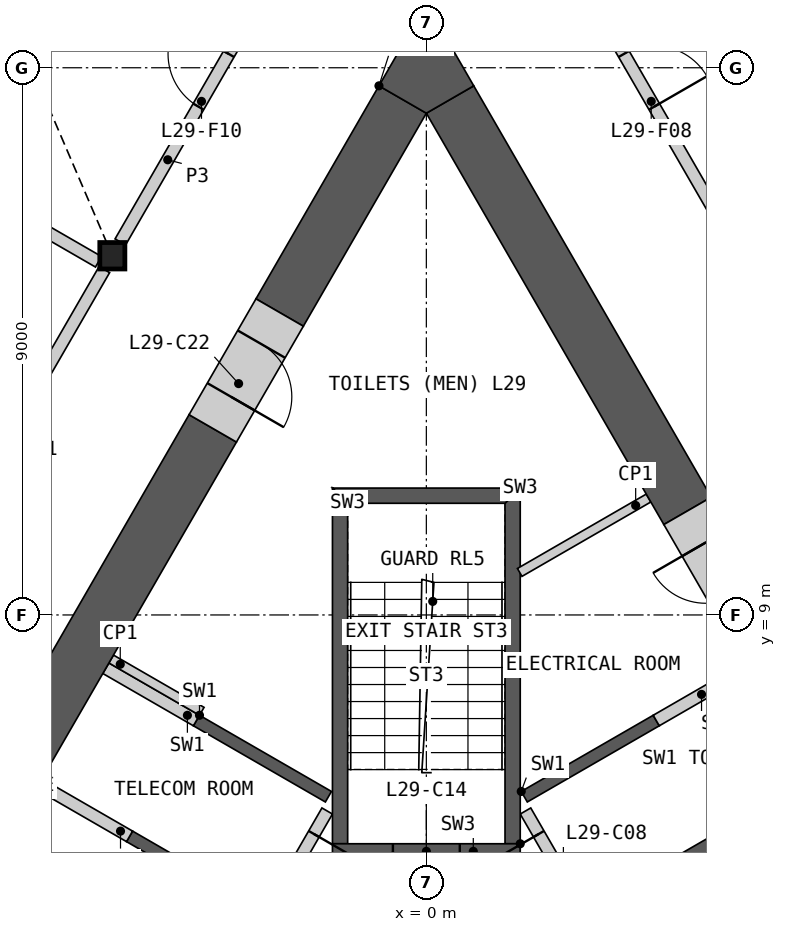
"""IFC4 building model, lengths in metres.
Left out: names, types, materials, properties, quantities, classifications, styles, units other than length and angle.
Written with IfcOpenShell. Run it as: python <this file> out.ifc"""

import sys

from ifc_helpers import new_model, si_unit, direction, frame, frame_2d, origin, origin_2d, place, context, subcontext, project, spatial, polyline, rectangle, i_section, outline, extrude, element, fill, save


model = new_model("IFC4")
c1 = context("Model", 3, precision=1e-05, world=origin(), true_north=direction((0.0, 1.0)))
c2 = subcontext(c1, "Body", "Model", "MODEL_VIEW")
j1 = project(units=[si_unit("LENGTHUNIT", "METRE"), si_unit("PLANEANGLEUNIT", "RADIAN")], contexts=[c1])
p1 = place(None, origin())
s1 = spatial("IfcSite", under=j1, at=p1, CompositionType="ELEMENT")
p2 = place(p1, origin())
s2 = spatial("IfcBuilding", under=s1, at=p2, CompositionType="ELEMENT")
p3 = place(p2, frame((0.0, 0.0, 137.4)))
s3 = spatial("IfcBuildingStorey", under=s2, at=p3, CompositionType="ELEMENT", Elevation=137.4)
p4 = place(p3, frame((-5.164, 14.908, 0.0), z_axis=(0.0, 0.0, 1.0), x_axis=(1.0, 0.0, 0.0)))
e1 = element("IfcColumn", 1, at=p4, inside=s3, PredefinedType="COLUMN", context=c2, shape_type="SweptSolid", body=[
    extrude(i_section(OverallWidth=0.412, OverallDepth=0.435, WebThickness=0.036, FlangeThickness=0.057, at=origin_2d()), origin(), (0.0, 0.0, 1.0), 4.2),
])
p5 = place(p3, origin())
e2 = element("IfcWall", 2, at=p5, inside=s3, PredefinedType="SHEAR", context=c2, shape_type="SweptSolid", body=[
    extrude(outline(polyline([(1.561, 6.097), (3.731, 7.35), (3.831, 7.177), (1.66, 5.924), (1.561, 6.097)])), origin(), (0.0, 0.0, 1.0), 3.8),
])
p6 = place(p3, origin())
e3 = element("IfcWall", 3, at=p6, inside=s3, PredefinedType="SHEAR", context=c2, shape_type="SweptSolid", body=[
    extrude(outline(polyline([(2.66, 4.192), (4.831, 5.445), (8.231, -0.444), (6.061, -1.697), (5.96, -1.524), (7.952, -0.374), (6.952, 1.358), (4.96, 0.208), (4.861, 0.381), (6.852, 1.531), (5.852, 3.263), (3.861, 2.113), (3.76, 2.287), (5.752, 3.437), (4.752, 5.169), (2.76, 4.019), (2.66, 4.192)])), origin(), (0.0, 0.0, 1.0), 3.8),
])
p7 = place(p3, frame((5.817, -1.476, 0.0), z_axis=(0.0, 0.0, 1.0), x_axis=(-0.500002616675, 0.866023893041, 0.0)))
e4 = element("IfcWall", 4, at=p7, inside=s3, PredefinedType="SOLIDWALL", context=c2, shape_type="SweptSolid", body=[
    extrude(rectangle(XDim=8.373, YDim=0.2, at=frame_2d((4.187, 0.0))), origin(), (0.0, 0.0, 1.0), 3.8),
])
p8 = place(p7, frame((0.337, 0.0, 0.0)))
e5 = element("IfcOpeningElement", 5, at=p8, cuts=e4, PredefinedType="OPENING", context=c2, shape_type="SweptSolid", body=[
    extrude(rectangle(XDim=1.1, YDim=2.1, at=frame_2d((0.55, 1.05))), frame((0.0, 0.11, 0.0), z_axis=(0.0, -1.0, 0.0), x_axis=(1.0, 0.0, 0.0)), (0.0, 0.0, 1.0), 0.22),
])
p9 = place(p7, frame((2.537, 0.0, 0.0)))
e6 = element("IfcOpeningElement", 6, at=p9, cuts=e4, PredefinedType="OPENING", context=c2, shape_type="SweptSolid", body=[
    extrude(rectangle(XDim=1.1, YDim=2.1, at=frame_2d((0.55, 1.05))), frame((0.0, 0.11, 0.0), z_axis=(0.0, -1.0, 0.0), x_axis=(1.0, 0.0, 0.0)), (0.0, 0.0, 1.0), 0.22),
])
p10 = place(p7, frame((4.737, 0.0, 0.0)))
e7 = element("IfcOpeningElement", 7, at=p10, cuts=e4, PredefinedType="OPENING", context=c2, shape_type="SweptSolid", body=[
    extrude(rectangle(XDim=1.1, YDim=2.1, at=frame_2d((0.55, 1.05))), frame((0.0, 0.11, 0.0), z_axis=(0.0, -1.0, 0.0), x_axis=(1.0, 0.0, 0.0)), (0.0, 0.0, 1.0), 0.22),
])
p11 = place(p7, frame((7.037, 0.0, 0.0)))
e8 = element("IfcOpeningElement", 8, at=p11, cuts=e4, PredefinedType="OPENING", context=c2, shape_type="SweptSolid", body=[
    extrude(rectangle(XDim=0.9, YDim=2.1, at=frame_2d((0.45, 1.05))), frame((0.0, 0.11, 0.0), z_axis=(0.0, -1.0, 0.0), x_axis=(1.0, 0.0, 0.0)), (0.0, 0.0, 1.0), 0.22),
])
p12 = place(p3, frame((3.781, 7.263, 0.0), z_axis=(0.0, 0.0, 1.0), x_axis=(0.865963414263, 0.500107353632, 0.0)))
e9 = element("IfcWall", 9, at=p12, inside=s3, PredefinedType="SHEAR", context=c2, shape_type="SweptSolid", body=[
    extrude(rectangle(XDim=1.72, YDim=0.2, at=frame_2d((0.86, 0.0))), origin(), (0.0, 0.0, 1.0), 3.8),
])
p13 = place(p3, origin())
e10 = element("IfcWall", 10, at=p13, inside=s3, PredefinedType="SHEAR", context=c2, shape_type="SweptSolid", body=[
    extrude(outline(polyline([(-2.76, 4.019), (-4.931, 5.272), (-4.831, 5.445), (-2.66, 4.192), (-2.76, 4.019)])), origin(), (0.0, 0.0, 1.0), 3.8),
])
p14 = place(p3, origin())
e11 = element("IfcWall", 11, at=p14, inside=s3, PredefinedType="SHEAR", context=c2, shape_type="SweptSolid", body=[
    extrude(outline(polyline([(-3.731, 7.35), (-1.561, 6.097), (-1.66, 5.924), (-3.831, 7.177), (-3.731, 7.35)])), origin(), (0.0, 0.0, 1.0), 3.8),
])
p15 = place(p3, frame((-1.631, 5.776, 0.0), z_axis=(0.0, 0.0, 1.0), x_axis=(-0.499992876559, -0.866029516466, 0.0)))
e12 = element("IfcWall", 12, at=p15, inside=s3, PredefinedType="SOLIDWALL", context=c2, shape_type="SweptSolid", body=[
    extrude(rectangle(XDim=6.486, YDim=0.2, at=frame_2d((3.243, 0.0))), origin(), (0.0, 0.0, 1.0), 3.8),
])
p16 = place(p15, frame((0.437, 0.0, 0.0)))
e13 = element("IfcOpeningElement", 13, at=p16, cuts=e12, PredefinedType="OPENING", context=c2, shape_type="SweptSolid", body=[
    extrude(rectangle(XDim=0.9, YDim=2.1, at=frame_2d((0.45, 1.05))), frame((0.0, 0.11, 0.0), z_axis=(0.0, -1.0, 0.0), x_axis=(1.0, 0.0, 0.0)), (0.0, 0.0, 1.0), 0.22),
])
p17 = place(p15, frame((2.637, 0.0, 0.0)))
e14 = element("IfcOpeningElement", 14, at=p17, cuts=e12, PredefinedType="OPENING", context=c2, shape_type="SweptSolid", body=[
    extrude(rectangle(XDim=0.9, YDim=2.1, at=frame_2d((0.45, 1.05))), frame((0.0, 0.11, 0.0), z_axis=(0.0, -1.0, 0.0), x_axis=(1.0, 0.0, 0.0)), (0.0, 0.0, 1.0), 0.22),
])
for number, where, z_axis, x_axis in (
    (15, (-3.781, 7.263, 0.0), (0.0, 0.0, 1.0), (-0.866, 0.5, 0.0)),
    (16, (-4.881, 5.358, 0.0), (0.0, 0.0, 1.0), (-0.866, 0.5, 0.0)),
):
    element("IfcWall", number, at=place(p3, frame(where, z_axis=z_axis, x_axis=x_axis)), inside=s3, PredefinedType="SHEAR", context=c2, shape_type="SweptSolid", body=[
        extrude(rectangle(XDim=1.72, YDim=0.2, at=frame_2d((0.86, 0.0))), origin(), (0.0, 0.0, 1.0), 3.8),
    ])
p18 = place(p3, origin())
e17 = element("IfcWall", 17, at=p18, inside=s3, PredefinedType="SHEAR", context=c2, shape_type="SweptSolid", body=[
    extrude(outline(polyline([(1.544, 5.237), (1.544, 11.087), (1.294, 10.837), (1.294, 5.237), (1.544, 5.237)])), origin(), (0.0, 0.0, 1.0), 3.8),
])
p19 = place(p3, origin())
e18 = element("IfcWall", 18, at=p19, inside=s3, PredefinedType="SHEAR", context=c2, shape_type="SweptSolid", body=[
    extrude(outline(polyline([(1.544, 11.087), (-1.544, 11.087), (-1.294, 10.837), (1.294, 10.837), (1.544, 11.087)])), origin(), (0.0, 0.0, 1.0), 3.8),
])
p20 = place(p3, origin())
e19 = element("IfcWall", 19, at=p20, inside=s3, PredefinedType="SHEAR", context=c2, shape_type="SweptSolid", body=[
    extrude(outline(polyline([(-1.294, 10.837), (-1.544, 11.087), (-1.544, 5.237), (-1.294, 5.237), (-1.294, 10.837)])), origin(), (0.0, 0.0, 1.0), 3.8),
])
p21 = place(p3, frame((1.544, 5.112, 0.0), z_axis=(0.0, 0.0, 1.0), x_axis=(-1.0, 0.0, 0.0)))
e20 = element("IfcWall", 20, at=p21, inside=s3, PredefinedType="SHEAR", context=c2, shape_type="SweptSolid", body=[
    extrude(rectangle(XDim=3.088, YDim=0.25, at=frame_2d((1.544, 0.0))), origin(), (0.0, 0.0, 1.0), 3.8),
])
p22 = place(p21, frame((0.994, 0.0, 0.0)))
e21 = element("IfcOpeningElement", 21, at=p22, cuts=e20, PredefinedType="OPENING", context=c2, shape_type="SweptSolid", body=[
    extrude(rectangle(XDim=1.1, YDim=2.1, at=frame_2d((0.55, 1.05))), frame((0.0, 0.135, 0.0), z_axis=(0.0, -1.0, 0.0), x_axis=(1.0, 0.0, 0.0)), (0.0, 0.0, 1.0), 0.27),
])
p23 = place(p3, frame((-3.693, 7.415, 0.0), z_axis=(0.0, 0.0, 1.0), x_axis=(-0.866024871741, 0.500000921525, 0.0)))
e22 = element("IfcWall", 22, at=p23, inside=s3, PredefinedType="PARTITIONING", context=c2, shape_type="SweptSolid", body=[
    extrude(rectangle(XDim=1.72, YDim=0.15, at=frame_2d((0.86, 0.0))), origin(), (0.0, 0.0, 1.0), 3.8),
])
p24 = place(p3, frame((3.654, 10.923, 0.0), z_axis=(0.0, 0.0, 1.0), x_axis=(-0.865974546186, -0.5000880776, 0.0)))
e23 = element("IfcWall", 23, at=p24, inside=s3, PredefinedType="PARTITIONING", context=c2, shape_type="SweptSolid", body=[
    extrude(rectangle(XDim=2.447, YDim=0.15, at=frame_2d((1.223, 0.0))), origin(), (0.0, 0.0, 1.0), 3.8),
])
p25 = place(p3, frame((4.296, 10.712, 0.0), z_axis=(0.0, 0.0, 1.0), x_axis=(-0.500011000363, 0.866019052629, 0.0)))
e24 = element("IfcWall", 24, at=p25, inside=s3, PredefinedType="SHEAR", context=c2, shape_type="SweptSolid", body=[
    extrude(rectangle(XDim=7.812, YDim=0.9, at=frame_2d((3.906, 0.0))), origin(), (0.0, 0.0, 1.0), 3.8),
])
p26 = place(p3, frame((-3.512, 12.069, 0.0), z_axis=(0.0, 0.0, 1.0), x_axis=(-0.500002126466, -0.866024176065, 0.0)))
e25 = element("IfcWall", 25, at=p26, inside=s3, PredefinedType="SHEAR", context=c2, shape_type="SweptSolid", body=[
    extrude(rectangle(XDim=8.816, YDim=0.9, at=frame_2d((4.408, 0.0))), origin(), (0.0, 0.0, 1.0), 3.8),
])
p27 = place(p3, frame((-0.39, 17.478, 0.0), z_axis=(0.0, 0.0, 1.0), x_axis=(-0.500046330384, -0.865998653272, 0.0)))
e26 = element("IfcWall", 26, at=p27, inside=s3, PredefinedType="SHEAR", context=c2, shape_type="SweptSolid", body=[
    extrude(rectangle(XDim=4.045, YDim=0.9, at=frame_2d((2.023, 0.0))), origin(), (0.0, 0.0, 1.0), 3.8),
])
p28 = place(p3, origin())
e27 = element("IfcWall", 27, at=p28, inside=s3, PredefinedType="SHEAR", context=c2, shape_type="SweptSolid", body=[
    extrude(outline(polyline([(-0.779, 17.703), (0.0, 19.052), (0.779, 17.703), (0.0, 17.253), (-0.779, 17.703)])), origin(), (0.0, 0.0, 1.0), 3.8),
])
p29 = place(p3, frame((5.396, 8.806, 0.0), z_axis=(0.0, 0.0, 1.0), x_axis=(-0.499981787252, 0.866035918664, 0.0)))
e28 = element("IfcWall", 28, at=p29, inside=s3, PredefinedType="SHEAR", context=c2, shape_type="SweptSolid", body=[
    extrude(rectangle(XDim=2.2, YDim=0.9, at=frame_2d((1.1, 0.0))), origin(), (0.0, 0.0, 1.0), 3.8),
])
p30 = place(p29, frame((0.6, 0.0, 0.0)))
e29 = element("IfcOpeningElement", 29, at=p30, cuts=e28, PredefinedType="OPENING", context=c2, shape_type="SweptSolid", body=[
    extrude(rectangle(XDim=1.0, YDim=2.1, at=frame_2d((0.5, 1.05))), frame((0.0, 0.46, 0.0), z_axis=(0.0, -1.0, 0.0), x_axis=(1.0, 0.0, 0.0)), (0.0, 0.0, 1.0), 0.92),
])
p31 = place(p3, frame((-2.413, 13.974, 0.0), z_axis=(0.0, 0.0, 1.0), x_axis=(-0.499946605688, -0.86605622881, 0.0)))
e30 = element("IfcWall", 30, at=p31, inside=s3, PredefinedType="SHEAR", context=c2, shape_type="SweptSolid", body=[
    extrude(rectangle(XDim=2.2, YDim=0.9, at=frame_2d((1.1, 0.0))), origin(), (0.0, 0.0, 1.0), 3.8),
])
p32 = place(p31, frame((0.6, 0.0, 0.0)))
e31 = element("IfcOpeningElement", 31, at=p32, cuts=e30, PredefinedType="OPENING", context=c2, shape_type="SweptSolid", body=[
    extrude(rectangle(XDim=1.0, YDim=2.1, at=frame_2d((0.5, 1.05))), frame((0.0, 0.46, 0.0), z_axis=(0.0, -1.0, 0.0), x_axis=(1.0, 0.0, 0.0)), (0.0, 0.0, 1.0), 0.92),
])
p33 = place(p3, frame((-10.197, 6.19, 0.0), z_axis=(0.0, 0.0, 1.0), x_axis=(0.500012035596, 0.866018454918, 0.0)))
e32 = element("IfcWall", 32, at=p33, inside=s3, PredefinedType="PARTITIONING", context=c2, shape_type="SweptSolid", body=[
    extrude(rectangle(XDim=9.803, YDim=0.2, at=frame_2d((4.902, 0.0))), origin(), (0.0, 0.0, 1.0), 3.8),
])
p34 = place(p33, frame((6.853, 0.0, 0.0)))
e33 = element("IfcOpeningElement", 33, at=p34, cuts=e32, PredefinedType="OPENING", context=c2, shape_type="SweptSolid", body=[
    extrude(rectangle(XDim=1.0, YDim=2.1, at=frame_2d((0.5, 1.05))), frame((0.0, 0.11, 0.0), z_axis=(0.0, -1.0, 0.0), x_axis=(1.0, 0.0, 0.0)), (0.0, 0.0, 1.0), 0.22),
])
p35 = place(p33, frame((1.851, 0.0, 0.0)))
e34 = element("IfcOpeningElement", 34, at=p35, cuts=e32, PredefinedType="OPENING", context=c2, shape_type="SweptSolid", body=[
    extrude(rectangle(XDim=1.0, YDim=2.1, at=frame_2d((0.5, 1.05))), frame((0.0, 0.11, 0.0), z_axis=(0.0, -1.0, 0.0), x_axis=(1.0, 0.0, 0.0)), (0.0, 0.0, 1.0), 0.22),
])
p36 = place(p3, frame((-5.033, 15.135, 0.0), z_axis=(0.0, 0.0, 1.0), x_axis=(0.499980978912, 0.866036385336, 0.0)))
e35 = element("IfcWall", 35, at=p36, inside=s3, PredefinedType="PARTITIONING", context=c2, shape_type="SweptSolid", body=[
    extrude(rectangle(XDim=6.24, YDim=0.2, at=frame_2d((3.12, 0.0))), origin(), (0.0, 0.0, 1.0), 3.8),
])
p37 = place(p36, frame((2.57, 0.0, 0.0)))
e36 = element("IfcOpeningElement", 36, at=p37, cuts=e35, PredefinedType="OPENING", context=c2, shape_type="SweptSolid", body=[
    extrude(rectangle(XDim=1.0, YDim=2.1, at=frame_2d((0.5, 1.05))), frame((0.0, 0.11, 0.0), z_axis=(0.0, -1.0, 0.0), x_axis=(1.0, 0.0, 0.0)), (0.0, 0.0, 1.0), 0.22),
])
p38 = place(p3, frame((1.913, 20.539, 0.0), z_axis=(0.0, 0.0, 1.0), x_axis=(0.499980978912, -0.866036385336, 0.0)))
e37 = element("IfcWall", 37, at=p38, inside=s3, PredefinedType="PARTITIONING", context=c2, shape_type="SweptSolid", body=[
    extrude(rectangle(XDim=6.24, YDim=0.2, at=frame_2d((3.12, 0.0))), origin(), (0.0, 0.0, 1.0), 3.8),
])
p39 = place(p38, frame((2.67, 0.0, 0.0)))
e38 = element("IfcOpeningElement", 38, at=p39, cuts=e37, PredefinedType="OPENING", context=c2, shape_type="SweptSolid", body=[
    extrude(rectangle(XDim=1.0, YDim=2.1, at=frame_2d((0.5, 1.05))), frame((0.0, 0.11, 0.0), z_axis=(0.0, -1.0, 0.0), x_axis=(1.0, 0.0, 0.0)), (0.0, 0.0, 1.0), 0.22),
])
p40 = place(p3, frame((-16.436, 21.186, 0.0), z_axis=(0.0, 0.0, 1.0), x_axis=(0.866023321739, -0.500003606191, 0.0)))
e39 = element("IfcWall", 39, at=p40, inside=s3, PredefinedType="PARTITIONING", context=c2, shape_type="SweptSolid", body=[
    extrude(rectangle(XDim=12.753, YDim=0.2, at=frame_2d((6.377, 0.0))), origin(), (0.0, 0.0, 1.0), 2.885),
])
p41 = place(p11, origin())
e40 = element("IfcDoor", 40, at=p41, inside=s3, OperationType="SINGLE_SWING_RIGHT", PredefinedType="DOOR", context=c2, shape_type="SweptSolid", body=[
    extrude(rectangle(XDim=0.9, YDim=2.1, at=frame_2d((0.45, 1.05))), frame((0.0, 0.025, 0.0), z_axis=(0.0, -1.0, 0.0), x_axis=(1.0, 0.0, 0.0)), (0.0, 0.0, 1.0), 0.05),
])
fill(e8, e40)
p42 = place(p16, origin())
e41 = element("IfcDoor", 41, at=p42, inside=s3, OperationType="SINGLE_SWING_LEFT", PredefinedType="DOOR", context=c2, shape_type="SweptSolid", body=[
    extrude(rectangle(XDim=0.9, YDim=2.1, at=frame_2d((0.45, 1.05))), frame((0.0, 0.025, 0.0), z_axis=(0.0, -1.0, 0.0), x_axis=(1.0, 0.0, 0.0)), (0.0, 0.0, 1.0), 0.05),
])
fill(e13, e41)
p43 = place(p22, origin())
e42 = element("IfcDoor", 42, at=p43, inside=s3, OperationType="SINGLE_SWING_RIGHT", PredefinedType="DOOR", context=c2, shape_type="SweptSolid", body=[
    extrude(rectangle(XDim=1.1, YDim=2.1, at=frame_2d((0.55, 1.05))), frame((0.0, 0.025, 0.0), z_axis=(0.0, -1.0, 0.0), x_axis=(1.0, 0.0, 0.0)), (0.0, 0.0, 1.0), 0.05),
])
fill(e21, e42)
p44 = place(p30, origin())
e43 = element("IfcDoor", 43, at=p44, inside=s3, OperationType="SINGLE_SWING_RIGHT", PredefinedType="DOOR", context=c2, shape_type="SweptSolid", body=[
    extrude(rectangle(XDim=1.0, YDim=2.1, at=frame_2d((0.5, 1.05))), frame((0.0, 0.205, 0.0), z_axis=(0.0, -1.0, 0.0), x_axis=(1.0, 0.0, 0.0)), (0.0, 0.0, 1.0), 0.05),
])
fill(e29, e43)
p45 = place(p32, origin())
e44 = element("IfcDoor", 44, at=p45, inside=s3, OperationType="SINGLE_SWING_RIGHT", PredefinedType="DOOR", context=c2, shape_type="SweptSolid", body=[
    extrude(rectangle(XDim=1.0, YDim=2.1, at=frame_2d((0.5, 1.05))), frame((0.0, 0.205, 0.0), z_axis=(0.0, -1.0, 0.0), x_axis=(1.0, 0.0, 0.0)), (0.0, 0.0, 1.0), 0.05),
])
fill(e31, e44)
p46 = place(p39, origin())
e45 = element("IfcDoor", 45, at=p46, inside=s3, OperationType="SINGLE_SWING_RIGHT", PredefinedType="DOOR", context=c2, shape_type="SweptSolid", body=[
    extrude(rectangle(XDim=1.0, YDim=2.1, at=frame_2d((0.5, 1.05))), frame((0.0, 0.025, 0.0), z_axis=(0.0, -1.0, 0.0), x_axis=(1.0, 0.0, 0.0)), (0.0, 0.0, 1.0), 0.05),
])
fill(e38, e45)
p47 = place(p37, origin())
e46 = element("IfcDoor", 46, at=p47, inside=s3, OperationType="SINGLE_SWING_RIGHT", PredefinedType="DOOR", context=c2, shape_type="SweptSolid", body=[
    extrude(rectangle(XDim=1.0, YDim=2.1, at=frame_2d((0.5, 1.05))), frame((0.0, 0.025, 0.0), z_axis=(0.0, -1.0, 0.0), x_axis=(1.0, 0.0, 0.0)), (0.0, 0.0, 1.0), 0.05),
])
fill(e36, e46)
save(model, sys.argv[1])
